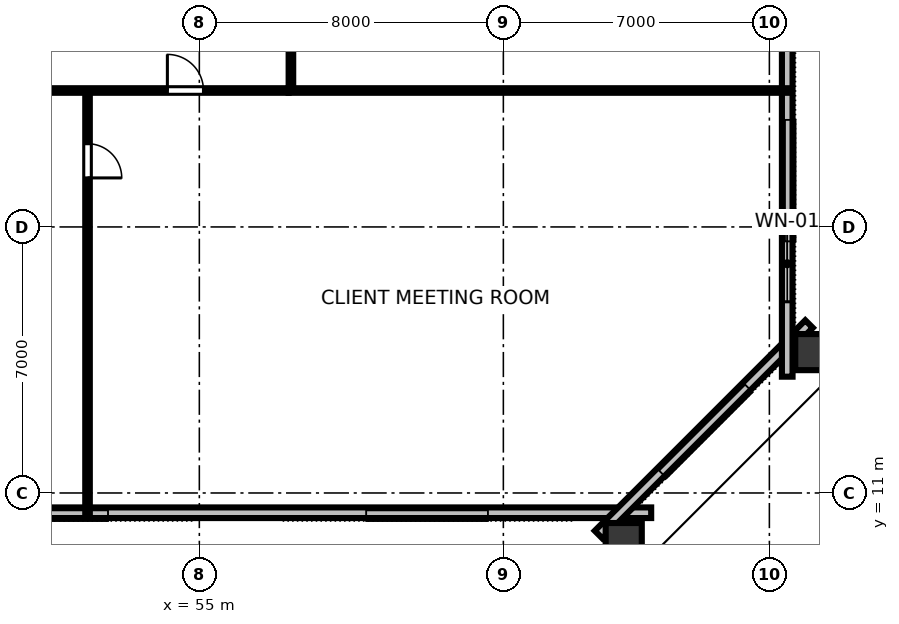
"""IFC4 building model, lengths in metres.
Left out: names, types, materials, properties, quantities, classifications, styles, units other than length and angle.
Written with IfcOpenShell. Run it as: python <this file> out.ifc"""

import sys

from ifc_helpers import new_model, si_unit, direction, frame, frame_2d, origin, origin_2d, place, context, subcontext, project, spatial, rectangle, hollow_rectangle, extrude, element, fill, save


model = new_model("IFC4")
c1 = context("Model", 3, precision=1e-05, world=origin(), true_north=direction((0.0, 1.0)))
c2 = subcontext(c1, "Body", "Model", "MODEL_VIEW")
j1 = project(units=[si_unit("LENGTHUNIT", "METRE"), si_unit("PLANEANGLEUNIT", "RADIAN")], contexts=[c1])
p1 = place(None, origin())
s1 = spatial("IfcSite", under=j1, at=p1, CompositionType="ELEMENT")
p2 = place(p1, origin())
s2 = spatial("IfcBuilding", under=s1, at=p2, CompositionType="ELEMENT")
p3 = place(p2, frame((0.0, 0.0, 60.4)))
s3 = spatial("IfcBuildingStorey", under=s2, at=p3, CompositionType="ELEMENT", Elevation=60.4)
for number, where, z_axis, x_axis in (
    (1, (66.168, 9.635, 0.0), (0.0, 0.0, 1.0), (1.0, 0.0, 0.0)),
    (2, (71.256, 14.707, 0.0), (0.0, 0.0, 1.0), (0.0, 1.0, 0.0)),
):
    element("IfcColumn", number, at=place(p3, frame(where, z_axis=z_axis, x_axis=x_axis)), inside=s3, PredefinedType="COLUMN", context=c2, shape_type="SweptSolid", body=[
        extrude(hollow_rectangle(XDim=0.95, YDim=1.15, WallThickness=0.06, at=origin_2d()), origin(), (0.0, 0.0, 1.0), 3.358),
    ])
p4 = place(p3, frame((25.11, 10.48, 0.0), z_axis=(0.0, 0.0, 1.0), x_axis=(1.0, 0.0, 0.0)))
e3 = element("IfcWall", 3, at=p4, inside=s3, PredefinedType="STANDARD", context=c2, shape_type="SweptSolid", body=[
    extrude(rectangle(XDim=41.78, YDim=0.28, at=frame_2d((20.89, 0.0))), origin(), (0.0, 0.0, 1.0), 3.36),
])
p5 = place(p3, frame((65.504, 9.906, 0.0), z_axis=(0.0, 0.0, 1.0), x_axis=(0.707106781187, 0.707106781187, 0.0)))
e4 = element("IfcWall", 4, at=p5, inside=s3, PredefinedType="STANDARD", context=c2, shape_type="SweptSolid", body=[
    extrude(rectangle(XDim=7.834, YDim=0.28, at=frame_2d((3.917, 0.0))), origin(), (0.0, 0.0, 1.0), 3.36),
])
p6 = place(p3, frame((70.47, 14.06, 0.0), z_axis=(0.0, 0.0, 1.0), x_axis=(0.0, 1.0, 0.0)))
e5 = element("IfcWall", 5, at=p6, inside=s3, PredefinedType="STANDARD", context=c2, shape_type="SweptSolid", body=[
    extrude(rectangle(XDim=35.88, YDim=0.28, at=frame_2d((17.94, 0.0))), origin(), (0.0, 0.0, 1.0), 3.36),
])
p7 = place(p6, frame((19.29, 0.0, 0.0)))
e6 = element("IfcOpeningElement", 6, at=p7, cuts=e5, PredefinedType="OPENING", context=c2, shape_type="SweptSolid", body=[
    extrude(rectangle(XDim=1.4, YDim=2.15, at=frame_2d((0.7, 1.075))), frame((0.0, 0.15, 0.0), z_axis=(0.0, -1.0, 0.0), x_axis=(1.0, 0.0, 0.0)), (0.0, 0.0, 1.0), 0.3),
])
p8 = place(p6, frame((1.971, 0.0, 0.8)))
e7 = element("IfcOpeningElement", 7, at=p8, cuts=e5, PredefinedType="OPENING", context=c2, shape_type="SweptSolid", body=[
    extrude(rectangle(XDim=2.0, YDim=1.95, at=frame_2d((1.0, 0.975))), frame((0.0, 0.15, 0.0), z_axis=(0.0, -1.0, 0.0), x_axis=(1.0, 0.0, 0.0)), (0.0, 0.0, 1.0), 0.3),
])
p9 = place(p6, frame((9.456, 0.0, 0.8)))
e8 = element("IfcOpeningElement", 8, at=p9, cuts=e5, PredefinedType="OPENING", context=c2, shape_type="SweptSolid", body=[
    extrude(rectangle(XDim=2.0, YDim=1.95, at=frame_2d((1.0, 0.975))), frame((0.0, 0.15, 0.0), z_axis=(0.0, -1.0, 0.0), x_axis=(1.0, 0.0, 0.0)), (0.0, 0.0, 1.0), 0.3),
])
p10 = place(p6, frame((24.424, 0.0, 0.8)))
e9 = element("IfcOpeningElement", 9, at=p10, cuts=e5, PredefinedType="OPENING", context=c2, shape_type="SweptSolid", body=[
    extrude(rectangle(XDim=2.0, YDim=1.95, at=frame_2d((1.0, 0.975))), frame((0.0, 0.15, 0.0), z_axis=(0.0, -1.0, 0.0), x_axis=(1.0, 0.0, 0.0)), (0.0, 0.0, 1.0), 0.3),
])
p11 = place(p6, frame((31.909, 0.0, 0.8)))
e10 = element("IfcOpeningElement", 10, at=p11, cuts=e5, PredefinedType="OPENING", context=c2, shape_type="SweptSolid", body=[
    extrude(rectangle(XDim=2.0, YDim=1.95, at=frame_2d((1.0, 0.975))), frame((0.0, 0.15, 0.0), z_axis=(0.0, -1.0, 0.0), x_axis=(1.0, 0.0, 0.0)), (0.0, 0.0, 1.0), 0.3),
])
p12 = place(p3, frame((52.058, 21.59, 0.0), z_axis=(0.0, 0.0, 1.0), x_axis=(0.0, -1.0, 0.0)))
e11 = element("IfcWall", 11, at=p12, inside=s3, PredefinedType="PARTITIONING", context=c2, shape_type="SweptSolid", body=[
    extrude(rectangle(XDim=11.11, YDim=0.12, at=frame_2d((5.555, 0.0))), origin(), (0.0, 0.0, 1.0), 2.64),
])
p13 = place(p12, frame((1.4, 0.0, 0.0)))
e12 = element("IfcOpeningElement", 12, at=p13, cuts=e11, PredefinedType="OPENING", context=c2, shape_type="SweptSolid", body=[
    extrude(rectangle(XDim=0.9, YDim=2.15, at=frame_2d((0.45, 1.075))), frame((0.0, 0.07, 0.0), z_axis=(0.0, -1.0, 0.0), x_axis=(1.0, 0.0, 0.0)), (0.0, 0.0, 1.0), 0.14),
])
p14 = place(p3, frame((34.65, 21.59, 0.0), z_axis=(0.0, 0.0, 1.0), x_axis=(1.0, 0.0, 0.0)))
e13 = element("IfcWall", 13, at=p14, inside=s3, PredefinedType="PARTITIONING", context=c2, shape_type="SweptSolid", body=[
    extrude(rectangle(XDim=22.7, YDim=0.12, at=frame_2d((11.35, 0.0))), origin(), (0.0, 0.0, 1.0), 2.64),
])
p15 = place(p14, frame((3.365, 0.0, 0.0)))
e14 = element("IfcOpeningElement", 14, at=p15, cuts=e13, PredefinedType="OPENING", context=c2, shape_type="SweptSolid", body=[
    extrude(rectangle(XDim=0.95, YDim=2.15, at=frame_2d((0.475, 1.075))), frame((0.0, 0.07, 0.0), z_axis=(0.0, -1.0, 0.0), x_axis=(1.0, 0.0, 0.0)), (0.0, 0.0, 1.0), 0.14),
])
p16 = place(p14, frame((8.718, 0.0, 0.0)))
e15 = element("IfcOpeningElement", 15, at=p16, cuts=e13, PredefinedType="OPENING", context=c2, shape_type="SweptSolid", body=[
    extrude(rectangle(XDim=0.95, YDim=2.15, at=frame_2d((0.475, 1.075))), frame((0.0, 0.07, 0.0), z_axis=(0.0, -1.0, 0.0), x_axis=(1.0, 0.0, 0.0)), (0.0, 0.0, 1.0), 0.14),
])
p17 = place(p14, frame((13.651, 0.0, 0.0)))
e16 = element("IfcOpeningElement", 16, at=p17, cuts=e13, PredefinedType="OPENING", context=c2, shape_type="SweptSolid", body=[
    extrude(rectangle(XDim=0.95, YDim=2.15, at=frame_2d((0.475, 1.075))), frame((0.0, 0.07, 0.0), z_axis=(0.0, -1.0, 0.0), x_axis=(1.0, 0.0, 0.0)), (0.0, 0.0, 1.0), 0.14),
])
p18 = place(p14, frame((19.509, 0.0, 0.0)))
e17 = element("IfcOpeningElement", 17, at=p18, cuts=e13, PredefinedType="OPENING", context=c2, shape_type="SweptSolid", body=[
    extrude(rectangle(XDim=0.95, YDim=2.15, at=frame_2d((0.475, 1.075))), frame((0.0, 0.07, 0.0), z_axis=(0.0, -1.0, 0.0), x_axis=(1.0, 0.0, 0.0)), (0.0, 0.0, 1.0), 0.14),
])
p19 = place(p3, frame((57.41, 21.65, 0.0), z_axis=(0.0, 0.0, 1.0), x_axis=(0.0, 1.0, 0.0)))
e18 = element("IfcWall", 18, at=p19, inside=s3, PredefinedType="PARTITIONING", context=c2, shape_type="SweptSolid", body=[
    extrude(rectangle(XDim=20.7, YDim=0.12, at=frame_2d((10.35, 0.0))), origin(), (0.0, 0.0, 1.0), 2.64),
])
p20 = place(p19, frame((3.502, 0.0, 0.0)))
e19 = element("IfcOpeningElement", 19, at=p20, cuts=e18, PredefinedType="OPENING", context=c2, shape_type="SweptSolid", body=[
    extrude(rectangle(XDim=0.95, YDim=2.15, at=frame_2d((0.475, 1.075))), frame((0.0, 0.07, 0.0), z_axis=(0.0, -1.0, 0.0), x_axis=(1.0, 0.0, 0.0)), (0.0, 0.0, 1.0), 0.14),
])
p21 = place(p19, frame((13.652, 0.0, 0.0)))
e20 = element("IfcOpeningElement", 20, at=p21, cuts=e18, PredefinedType="OPENING", context=c2, shape_type="SweptSolid", body=[
    extrude(rectangle(XDim=0.95, YDim=2.15, at=frame_2d((0.475, 1.075))), frame((0.0, 0.07, 0.0), z_axis=(0.0, -1.0, 0.0), x_axis=(1.0, 0.0, 0.0)), (0.0, 0.0, 1.0), 0.14),
])
p22 = place(p3, frame((57.35, 21.59, 0.0), z_axis=(0.0, 0.0, 1.0), x_axis=(1.0, 0.0, 0.0)))
e21 = element("IfcWall", 21, at=p22, inside=s3, PredefinedType="PARTITIONING", context=c2, shape_type="SweptSolid", body=[
    extrude(rectangle(XDim=13.12, YDim=0.12, at=frame_2d((6.56, 0.0))), origin(), (0.0, 0.0, 1.0), 2.64),
])
p23 = place(p8, origin())
e22 = element("IfcWindow", 22, at=p23, inside=s3, PartitioningType="SINGLE_PANEL", PredefinedType="WINDOW", context=c2, shape_type="SweptSolid", body=[
    extrude(rectangle(XDim=2.0, YDim=1.95, at=frame_2d((1.0, 0.975))), frame((0.0, 0.03, 0.0), z_axis=(0.0, -1.0, 0.0), x_axis=(1.0, 0.0, 0.0)), (0.0, 0.0, 1.0), 0.06),
])
fill(e7, e22)
p24 = place(p13, origin())
e23 = element("IfcDoor", 23, at=p24, inside=s3, OperationType="SINGLE_SWING_RIGHT", PredefinedType="DOOR", context=c2, shape_type="SweptSolid", body=[
    extrude(rectangle(XDim=0.9, YDim=2.15, at=frame_2d((0.45, 1.075))), frame((0.0, 0.025, 0.0), z_axis=(0.0, -1.0, 0.0), x_axis=(1.0, 0.0, 0.0)), (0.0, 0.0, 1.0), 0.05),
])
fill(e12, e23)
p25 = place(p18, origin())
e24 = element("IfcDoor", 24, at=p25, inside=s3, OperationType="SINGLE_SWING_LEFT", PredefinedType="DOOR", context=c2, shape_type="SweptSolid", body=[
    extrude(rectangle(XDim=0.95, YDim=2.15, at=frame_2d((0.475, 1.075))), frame((0.0, 0.025, 0.0), z_axis=(0.0, -1.0, 0.0), x_axis=(1.0, 0.0, 0.0)), (0.0, 0.0, 1.0), 0.05),
])
fill(e17, e24)
save(model, sys.argv[1])
